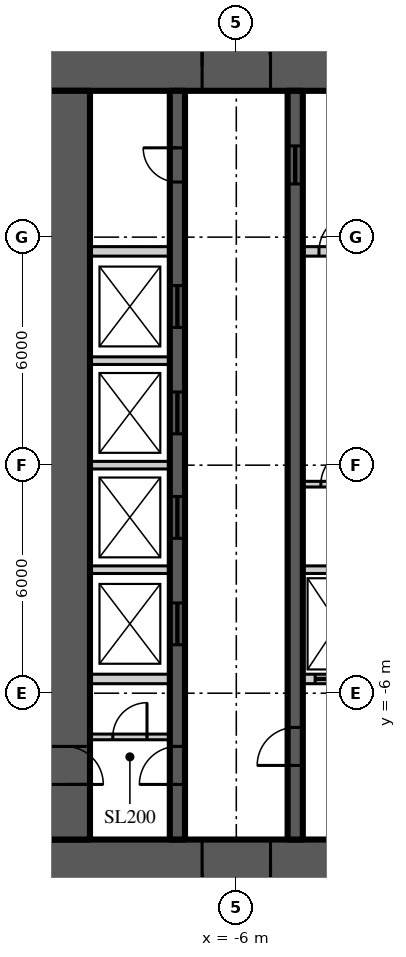
"""IFC4 building model, lengths in metres.
Left out: names, types, materials, properties, quantities, classifications, styles, units other than length and angle.
Written with IfcOpenShell. Run it as: python <this file> out.ifc"""

import sys

from ifc_helpers import new_model, si_unit, direction, frame, frame_2d, origin, place, context, subcontext, project, spatial, rectangle, extrude, element, fill, save


model = new_model("IFC4")
c1 = context("Model", 3, precision=1e-05, world=origin(), true_north=direction((0.0, 1.0)))
c2 = subcontext(c1, "Body", "Model", "MODEL_VIEW")
j1 = project(units=[si_unit("LENGTHUNIT", "METRE"), si_unit("PLANEANGLEUNIT", "RADIAN")], contexts=[c1])
p1 = place(None, origin())
s1 = spatial("IfcSite", under=j1, at=p1, CompositionType="ELEMENT")
p2 = place(p1, origin())
s2 = spatial("IfcBuilding", under=s1, at=p2, CompositionType="ELEMENT")
p3 = place(p2, frame((0.0, 0.0, 63.0)))
s3 = spatial("IfcBuildingStorey", under=s2, at=p3, CompositionType="ELEMENT", Elevation=63.0)
p4 = place(p3, frame((-11.15, 10.5, 0.0), z_axis=(0.0, 0.0, 1.0), x_axis=(1.0, 0.0, 0.0)))
e1 = element("IfcWall", 1, at=p4, inside=s3, PredefinedType="SHEAR", context=c2, shape_type="SweptSolid", body=[
    extrude(rectangle(XDim=22.3, YDim=1.3, at=frame_2d((11.15, 0.0))), origin(), (0.0, 0.0, 1.0), 3.9),
])
p5 = place(p4, frame((4.25, 0.0, 0.0)))
e2 = element("IfcOpeningElement", 2, at=p5, cuts=e1, PredefinedType="OPENING", context=c2, shape_type="SweptSolid", body=[
    extrude(rectangle(XDim=1.8, YDim=2.2, at=frame_2d((0.9, 1.1))), frame((0.0, 0.66, 0.0), z_axis=(0.0, -1.0, 0.0), x_axis=(1.0, 0.0, 0.0)), (0.0, 0.0, 1.0), 1.32),
])
p6 = place(p4, frame((16.25, 0.0, 0.0)))
e3 = element("IfcOpeningElement", 3, at=p6, cuts=e1, PredefinedType="OPENING", context=c2, shape_type="SweptSolid", body=[
    extrude(rectangle(XDim=1.8, YDim=2.2, at=frame_2d((0.9, 1.1))), frame((0.0, 0.66, 0.0), z_axis=(0.0, -1.0, 0.0), x_axis=(1.0, 0.0, 0.0)), (0.0, 0.0, 1.0), 1.32),
])
p7 = place(p3, frame((11.15, -10.5, 0.0), z_axis=(0.0, 0.0, 1.0), x_axis=(-1.0, 0.0, 0.0)))
e4 = element("IfcWall", 4, at=p7, inside=s3, PredefinedType="SHEAR", context=c2, shape_type="SweptSolid", body=[
    extrude(rectangle(XDim=22.3, YDim=1.3, at=frame_2d((11.15, 0.0))), origin(), (0.0, 0.0, 1.0), 3.9),
])
p8 = place(p7, frame((16.25, 0.0, 0.0)))
e5 = element("IfcOpeningElement", 5, at=p8, cuts=e4, PredefinedType="OPENING", context=c2, shape_type="SweptSolid", body=[
    extrude(rectangle(XDim=1.8, YDim=2.2, at=frame_2d((0.9, 1.1))), frame((0.0, 0.66, 0.0), z_axis=(0.0, -1.0, 0.0), x_axis=(1.0, 0.0, 0.0)), (0.0, 0.0, 1.0), 1.32),
])
p9 = place(p7, frame((4.25, 0.0, 0.0)))
e6 = element("IfcOpeningElement", 6, at=p9, cuts=e4, PredefinedType="OPENING", context=c2, shape_type="SweptSolid", body=[
    extrude(rectangle(XDim=1.8, YDim=2.2, at=frame_2d((0.9, 1.1))), frame((0.0, 0.66, 0.0), z_axis=(0.0, -1.0, 0.0), x_axis=(1.0, 0.0, 0.0)), (0.0, 0.0, 1.0), 1.32),
])
p10 = place(p3, frame((-10.5, 9.85, 0.0), z_axis=(0.0, 0.0, 1.0), x_axis=(0.0, -1.0, 0.0)))
e7 = element("IfcWall", 7, at=p10, inside=s3, PredefinedType="SHEAR", context=c2, shape_type="SweptSolid", body=[
    extrude(rectangle(XDim=19.7, YDim=1.3, at=frame_2d((9.85, 0.0))), origin(), (0.0, 0.0, 1.0), 3.9),
])
p11 = place(p10, frame((17.25, 0.0, 0.0)))
e8 = element("IfcOpeningElement", 8, at=p11, cuts=e7, PredefinedType="OPENING", context=c2, shape_type="SweptSolid", body=[
    extrude(rectangle(XDim=1.0, YDim=2.2, at=frame_2d((0.5, 1.1))), frame((0.0, 0.66, 0.0), z_axis=(0.0, -1.0, 0.0), x_axis=(1.0, 0.0, 0.0)), (0.0, 0.0, 1.0), 1.32),
])
p12 = place(p3, frame((-7.55, -9.85, 0.0), z_axis=(0.0, 0.0, 1.0), x_axis=(0.0, 1.0, 0.0)))
e9 = element("IfcWall", 9, at=p12, inside=s3, PredefinedType="SHEAR", context=c2, shape_type="SweptSolid", body=[
    extrude(rectangle(XDim=19.7, YDim=0.4, at=frame_2d((9.85, 0.0))), origin(), (0.0, 0.0, 1.0), 3.9),
])
p13 = place(p12, frame((1.45, 0.0, 0.0)))
e10 = element("IfcOpeningElement", 10, at=p13, cuts=e9, PredefinedType="OPENING", context=c2, shape_type="SweptSolid", body=[
    extrude(rectangle(XDim=1.0, YDim=2.2, at=frame_2d((0.5, 1.1))), frame((0.0, 0.21, 0.0), z_axis=(0.0, -1.0, 0.0), x_axis=(1.0, 0.0, 0.0)), (0.0, 0.0, 1.0), 0.42),
])
p14 = place(p12, frame((17.3, 0.0, 0.0)))
e11 = element("IfcOpeningElement", 11, at=p14, cuts=e9, PredefinedType="OPENING", context=c2, shape_type="SweptSolid", body=[
    extrude(rectangle(XDim=0.9, YDim=2.1, at=frame_2d((0.45, 1.05))), frame((0.0, 0.21, 0.0), z_axis=(0.0, -1.0, 0.0), x_axis=(1.0, 0.0, 0.0)), (0.0, 0.0, 1.0), 0.42),
])
p15 = place(p12, frame((5.125, 0.0, 0.0)))
e12 = element("IfcOpeningElement", 12, at=p15, cuts=e9, PredefinedType="OPENING", context=c2, shape_type="SweptSolid", body=[
    extrude(rectangle(XDim=1.1, YDim=2.2, at=frame_2d((0.55, 1.1))), frame((0.0, 0.21, 0.0), z_axis=(0.0, -1.0, 0.0), x_axis=(1.0, 0.0, 0.0)), (0.0, 0.0, 1.0), 0.42),
])
p16 = place(p12, frame((7.925, 0.0, 0.0)))
e13 = element("IfcOpeningElement", 13, at=p16, cuts=e9, PredefinedType="OPENING", context=c2, shape_type="SweptSolid", body=[
    extrude(rectangle(XDim=1.1, YDim=2.2, at=frame_2d((0.55, 1.1))), frame((0.0, 0.21, 0.0), z_axis=(0.0, -1.0, 0.0), x_axis=(1.0, 0.0, 0.0)), (0.0, 0.0, 1.0), 0.42),
])
p17 = place(p12, frame((10.675, 0.0, 0.0)))
e14 = element("IfcOpeningElement", 14, at=p17, cuts=e9, PredefinedType="OPENING", context=c2, shape_type="SweptSolid", body=[
    extrude(rectangle(XDim=1.1, YDim=2.2, at=frame_2d((0.55, 1.1))), frame((0.0, 0.21, 0.0), z_axis=(0.0, -1.0, 0.0), x_axis=(1.0, 0.0, 0.0)), (0.0, 0.0, 1.0), 0.42),
])
p18 = place(p12, frame((13.475, 0.0, 0.0)))
e15 = element("IfcOpeningElement", 15, at=p18, cuts=e9, PredefinedType="OPENING", context=c2, shape_type="SweptSolid", body=[
    extrude(rectangle(XDim=1.1, YDim=2.2, at=frame_2d((0.55, 1.1))), frame((0.0, 0.21, 0.0), z_axis=(0.0, -1.0, 0.0), x_axis=(1.0, 0.0, 0.0)), (0.0, 0.0, 1.0), 0.42),
])
p19 = place(p3, frame((-4.45, -9.85, 0.0), z_axis=(0.0, 0.0, 1.0), x_axis=(0.0, 1.0, 0.0)))
e16 = element("IfcWall", 16, at=p19, inside=s3, PredefinedType="SHEAR", context=c2, shape_type="SweptSolid", body=[
    extrude(rectangle(XDim=19.7, YDim=0.4, at=frame_2d((9.85, 0.0))), origin(), (0.0, 0.0, 1.0), 3.9),
])
p20 = place(p19, frame((1.95, 0.0, 0.0)))
e17 = element("IfcOpeningElement", 17, at=p20, cuts=e16, PredefinedType="OPENING", context=c2, shape_type="SweptSolid", body=[
    extrude(rectangle(XDim=1.0, YDim=2.2, at=frame_2d((0.5, 1.1))), frame((0.0, 0.21, 0.0), z_axis=(0.0, -1.0, 0.0), x_axis=(1.0, 0.0, 0.0)), (0.0, 0.0, 1.0), 0.42),
])
p21 = place(p19, frame((17.25, 0.0, 0.0)))
e18 = element("IfcOpeningElement", 18, at=p21, cuts=e16, PredefinedType="OPENING", context=c2, shape_type="SweptSolid", body=[
    extrude(rectangle(XDim=1.0, YDim=2.1, at=frame_2d((0.5, 1.05))), frame((0.0, 0.21, 0.0), z_axis=(0.0, -1.0, 0.0), x_axis=(1.0, 0.0, 0.0)), (0.0, 0.0, 1.0), 0.42),
])
p22 = place(p3, frame((-9.85, 5.625, 0.0), z_axis=(0.0, 0.0, 1.0), x_axis=(1.0, 0.0, 0.0)))
e19 = element("IfcWall", 19, at=p22, inside=s3, PredefinedType="SOLIDWALL", context=c2, shape_type="SweptSolid", body=[
    extrude(rectangle(XDim=2.1, YDim=0.25, at=frame_2d((1.05, 0.0))), origin(), (0.0, 0.0, 1.0), 3.7),
])
p23 = place(p3, frame((-4.25, 5.625, 0.0), z_axis=(0.0, 0.0, 1.0), x_axis=(1.0, 0.0, 0.0)))
e20 = element("IfcWall", 20, at=p23, inside=s3, PredefinedType="SOLIDWALL", context=c2, shape_type="SweptSolid", body=[
    extrude(rectangle(XDim=1.85, YDim=0.25, at=frame_2d((0.925, 0.0))), origin(), (0.0, 0.0, 1.0), 3.7),
])
p24 = place(p23, frame((0.425, 0.0, 0.0)))
e21 = element("IfcOpeningElement", 21, at=p24, cuts=e20, PredefinedType="OPENING", context=c2, shape_type="SweptSolid", body=[
    extrude(rectangle(XDim=1.0, YDim=2.2, at=frame_2d((0.5, 1.1))), frame((0.0, 0.135, 0.0), z_axis=(0.0, -1.0, 0.0), x_axis=(1.0, 0.0, 0.0)), (0.0, 0.0, 1.0), 0.27),
])
p25 = place(p3, frame((-9.85, -5.625, 0.0), z_axis=(0.0, 0.0, 1.0), x_axis=(1.0, 0.0, 0.0)))
e22 = element("IfcWall", 22, at=p25, inside=s3, PredefinedType="SOLIDWALL", context=c2, shape_type="SweptSolid", body=[
    extrude(rectangle(XDim=2.1, YDim=0.25, at=frame_2d((1.05, 0.0))), origin(), (0.0, 0.0, 1.0), 3.7),
])
p26 = place(p3, frame((-4.25, -5.625, 0.0), z_axis=(0.0, 0.0, 1.0), x_axis=(1.0, 0.0, 0.0)))
e23 = element("IfcWall", 23, at=p26, inside=s3, PredefinedType="SOLIDWALL", context=c2, shape_type="SweptSolid", body=[
    extrude(rectangle(XDim=1.85, YDim=0.25, at=frame_2d((0.925, 0.0))), origin(), (0.0, 0.0, 1.0), 3.7),
])
p27 = place(p26, frame((0.325, 0.0, 0.0)))
e24 = element("IfcOpeningElement", 24, at=p27, cuts=e23, PredefinedType="OPENING", context=c2, shape_type="SweptSolid", body=[
    extrude(rectangle(XDim=1.2, YDim=2.2, at=frame_2d((0.6, 1.1))), frame((0.0, 0.135, 0.0), z_axis=(0.0, -1.0, 0.0), x_axis=(1.0, 0.0, 0.0)), (0.0, 0.0, 1.0), 0.27),
])
p28 = place(p3, frame((-9.85, -2.75, 0.0), z_axis=(0.0, 0.0, 1.0), x_axis=(1.0, 0.0, 0.0)))
e25 = element("IfcWall", 25, at=p28, inside=s3, PredefinedType="SOLIDWALL", context=c2, shape_type="SweptSolid", body=[
    extrude(rectangle(XDim=2.1, YDim=0.2, at=frame_2d((1.05, 0.0))), origin(), (0.0, 0.0, 1.0), 3.7),
])
p29 = place(p3, frame((-4.25, -2.75, 0.0), z_axis=(0.0, 0.0, 1.0), x_axis=(1.0, 0.0, 0.0)))
e26 = element("IfcWall", 26, at=p29, inside=s3, PredefinedType="SOLIDWALL", context=c2, shape_type="SweptSolid", body=[
    extrude(rectangle(XDim=1.85, YDim=0.2, at=frame_2d((0.925, 0.0))), origin(), (0.0, 0.0, 1.0), 3.7),
])
for number, where, z_axis, x_axis in (
    (27, (-9.85, 0.0, 0.0), (0.0, 0.0, 1.0), (1.0, 0.0, 0.0)),
    (28, (-9.85, 2.75, 0.0), (0.0, 0.0, 1.0), (1.0, 0.0, 0.0)),
):
    element("IfcWall", number, at=place(p3, frame(where, z_axis=z_axis, x_axis=x_axis)), inside=s3, PredefinedType="SOLIDWALL", context=c2, shape_type="SweptSolid", body=[
        extrude(rectangle(XDim=2.1, YDim=0.2, at=frame_2d((1.05, 0.0))), origin(), (0.0, 0.0, 1.0), 3.7),
    ])
p30 = place(p3, frame((-4.25, -0.5, 0.0), z_axis=(0.0, 0.0, 1.0), x_axis=(1.0, 0.0, 0.0)))
e29 = element("IfcWall", 29, at=p30, inside=s3, PredefinedType="SOLIDWALL", context=c2, shape_type="SweptSolid", body=[
    extrude(rectangle(XDim=1.85, YDim=0.15, at=frame_2d((0.925, 0.0))), origin(), (0.0, 0.0, 1.0), 3.77),
])
p31 = place(p30, frame((0.475, 0.0, 0.0)))
e30 = element("IfcOpeningElement", 30, at=p31, cuts=e29, PredefinedType="OPENING", context=c2, shape_type="SweptSolid", body=[
    extrude(rectangle(XDim=0.9, YDim=2.1, at=frame_2d((0.45, 1.05))), frame((0.0, 0.085, 0.0), z_axis=(0.0, -1.0, 0.0), x_axis=(1.0, 0.0, 0.0)), (0.0, 0.0, 1.0), 0.17),
])
p32 = place(p3, frame((-9.85, -7.15, 0.0), z_axis=(0.0, 0.0, 1.0), x_axis=(1.0, 0.0, 0.0)))
e31 = element("IfcWall", 31, at=p32, inside=s3, PredefinedType="SOLIDWALL", context=c2, shape_type="SweptSolid", body=[
    extrude(rectangle(XDim=2.1, YDim=0.15, at=frame_2d((1.05, 0.0))), origin(), (0.0, 0.0, 1.0), 3.77),
])
p33 = place(p32, frame((0.6, 0.0, 0.0)))
e32 = element("IfcOpeningElement", 32, at=p33, cuts=e31, PredefinedType="OPENING", context=c2, shape_type="SweptSolid", body=[
    extrude(rectangle(XDim=0.9, YDim=2.1, at=frame_2d((0.45, 1.05))), frame((0.0, 0.085, 0.0), z_axis=(0.0, -1.0, 0.0), x_axis=(1.0, 0.0, 0.0)), (0.0, 0.0, 1.0), 0.17),
])
p34 = place(p5, origin())
e33 = element("IfcDoor", 33, at=p34, inside=s3, OperationType="DOUBLE_DOOR_DOUBLE_SWING", PredefinedType="DOOR", context=c2, shape_type="SweptSolid", body=[
    extrude(rectangle(XDim=1.8, YDim=2.2, at=frame_2d((0.9, 1.1))), frame((0.0, 0.025, 0.0), z_axis=(0.0, -1.0, 0.0), x_axis=(1.0, 0.0, 0.0)), (0.0, 0.0, 1.0), 0.05),
])
fill(e2, e33)
p35 = place(p8, origin())
e34 = element("IfcDoor", 34, at=p35, inside=s3, OperationType="DOUBLE_DOOR_DOUBLE_SWING", PredefinedType="DOOR", context=c2, shape_type="SweptSolid", body=[
    extrude(rectangle(XDim=1.8, YDim=2.2, at=frame_2d((0.9, 1.1))), frame((0.0, 0.025, 0.0), z_axis=(0.0, -1.0, 0.0), x_axis=(1.0, 0.0, 0.0)), (0.0, 0.0, 1.0), 0.05),
])
fill(e5, e34)
p36 = place(p13, origin())
e35 = element("IfcDoor", 35, at=p36, inside=s3, OperationType="SINGLE_SWING_LEFT", PredefinedType="DOOR", context=c2, shape_type="SweptSolid", body=[
    extrude(rectangle(XDim=1.0, YDim=2.2, at=frame_2d((0.5, 1.1))), frame((0.0, 0.025, 0.0), z_axis=(0.0, -1.0, 0.0), x_axis=(1.0, 0.0, 0.0)), (0.0, 0.0, 1.0), 0.05),
])
fill(e10, e35)
p37 = place(p11, origin())
e36 = element("IfcDoor", 36, at=p37, inside=s3, OperationType="SINGLE_SWING_RIGHT", PredefinedType="DOOR", context=c2, shape_type="SweptSolid", body=[
    extrude(rectangle(XDim=1.0, YDim=2.2, at=frame_2d((0.5, 1.1))), frame((0.0, 0.025, 0.0), z_axis=(0.0, -1.0, 0.0), x_axis=(1.0, 0.0, 0.0)), (0.0, 0.0, 1.0), 0.05),
])
fill(e8, e36)
p38 = place(p20, origin())
e37 = element("IfcDoor", 37, at=p38, inside=s3, OperationType="SINGLE_SWING_LEFT", PredefinedType="DOOR", context=c2, shape_type="SweptSolid", body=[
    extrude(rectangle(XDim=1.0, YDim=2.2, at=frame_2d((0.5, 1.1))), frame((0.0, 0.025, 0.0), z_axis=(0.0, -1.0, 0.0), x_axis=(1.0, 0.0, 0.0)), (0.0, 0.0, 1.0), 0.05),
])
fill(e17, e37)
p39 = place(p14, origin())
e38 = element("IfcDoor", 38, at=p39, inside=s3, OperationType="SINGLE_SWING_RIGHT", PredefinedType="DOOR", context=c2, shape_type="SweptSolid", body=[
    extrude(rectangle(XDim=0.9, YDim=2.1, at=frame_2d((0.45, 1.05))), frame((0.0, 0.025, 0.0), z_axis=(0.0, -1.0, 0.0), x_axis=(1.0, 0.0, 0.0)), (0.0, 0.0, 1.0), 0.05),
])
fill(e11, e38)
p40 = place(p21, origin())
e39 = element("IfcDoor", 39, at=p40, inside=s3, OperationType="SLIDING_TO_LEFT", PredefinedType="DOOR", context=c2, shape_type="SweptSolid", body=[
    extrude(rectangle(XDim=1.0, YDim=2.1, at=frame_2d((0.5, 1.05))), frame((0.0, 0.025, 0.0), z_axis=(0.0, -1.0, 0.0), x_axis=(1.0, 0.0, 0.0)), (0.0, 0.0, 1.0), 0.05),
])
fill(e18, e39)
p41 = place(p15, origin())
e40 = element("IfcDoor", 40, at=p41, inside=s3, OperationType="SLIDING_TO_LEFT", PredefinedType="DOOR", context=c2, shape_type="SweptSolid", body=[
    extrude(rectangle(XDim=1.1, YDim=2.2, at=frame_2d((0.55, 1.1))), frame((0.0, 0.025, 0.0), z_axis=(0.0, -1.0, 0.0), x_axis=(1.0, 0.0, 0.0)), (0.0, 0.0, 1.0), 0.05),
])
fill(e12, e40)
p42 = place(p16, origin())
e41 = element("IfcDoor", 41, at=p42, inside=s3, OperationType="SLIDING_TO_LEFT", PredefinedType="DOOR", context=c2, shape_type="SweptSolid", body=[
    extrude(rectangle(XDim=1.1, YDim=2.2, at=frame_2d((0.55, 1.1))), frame((0.0, 0.025, 0.0), z_axis=(0.0, -1.0, 0.0), x_axis=(1.0, 0.0, 0.0)), (0.0, 0.0, 1.0), 0.05),
])
fill(e13, e41)
p43 = place(p17, origin())
e42 = element("IfcDoor", 42, at=p43, inside=s3, OperationType="SLIDING_TO_LEFT", PredefinedType="DOOR", context=c2, shape_type="SweptSolid", body=[
    extrude(rectangle(XDim=1.1, YDim=2.2, at=frame_2d((0.55, 1.1))), frame((0.0, 0.025, 0.0), z_axis=(0.0, -1.0, 0.0), x_axis=(1.0, 0.0, 0.0)), (0.0, 0.0, 1.0), 0.05),
])
fill(e14, e42)
p44 = place(p18, origin())
e43 = element("IfcDoor", 43, at=p44, inside=s3, OperationType="SLIDING_TO_LEFT", PredefinedType="DOOR", context=c2, shape_type="SweptSolid", body=[
    extrude(rectangle(XDim=1.1, YDim=2.2, at=frame_2d((0.55, 1.1))), frame((0.0, 0.025, 0.0), z_axis=(0.0, -1.0, 0.0), x_axis=(1.0, 0.0, 0.0)), (0.0, 0.0, 1.0), 0.05),
])
fill(e15, e43)
p45 = place(p27, origin())
e44 = element("IfcDoor", 44, at=p45, inside=s3, OperationType="SLIDING_TO_LEFT", PredefinedType="DOOR", context=c2, shape_type="SweptSolid", body=[
    extrude(rectangle(XDim=1.2, YDim=2.2, at=frame_2d((0.6, 1.1))), frame((0.0, 0.025, 0.0), z_axis=(0.0, -1.0, 0.0), x_axis=(1.0, 0.0, 0.0)), (0.0, 0.0, 1.0), 0.05),
])
fill(e24, e44)
p46 = place(p31, origin())
e45 = element("IfcDoor", 45, at=p46, inside=s3, OperationType="SINGLE_SWING_RIGHT", PredefinedType="DOOR", context=c2, shape_type="SweptSolid", body=[
    extrude(rectangle(XDim=0.9, YDim=2.1, at=frame_2d((0.45, 1.05))), frame((0.0, 0.025, 0.0), z_axis=(0.0, -1.0, 0.0), x_axis=(1.0, 0.0, 0.0)), (0.0, 0.0, 1.0), 0.05),
])
fill(e30, e45)
p47 = place(p24, origin())
e46 = element("IfcDoor", 46, at=p47, inside=s3, OperationType="SINGLE_SWING_RIGHT", PredefinedType="DOOR", context=c2, shape_type="SweptSolid", body=[
    extrude(rectangle(XDim=1.0, YDim=2.2, at=frame_2d((0.5, 1.1))), frame((0.0, 0.025, 0.0), z_axis=(0.0, -1.0, 0.0), x_axis=(1.0, 0.0, 0.0)), (0.0, 0.0, 1.0), 0.05),
])
fill(e21, e46)
p48 = place(p33, origin())
e47 = element("IfcDoor", 47, at=p48, inside=s3, OperationType="SINGLE_SWING_RIGHT", PredefinedType="DOOR", context=c2, shape_type="SweptSolid", body=[
    extrude(rectangle(XDim=0.9, YDim=2.1, at=frame_2d((0.45, 1.05))), frame((0.0, 0.025, 0.0), z_axis=(0.0, -1.0, 0.0), x_axis=(1.0, 0.0, 0.0)), (0.0, 0.0, 1.0), 0.05),
])
fill(e32, e47)
save(model, sys.argv[1])
